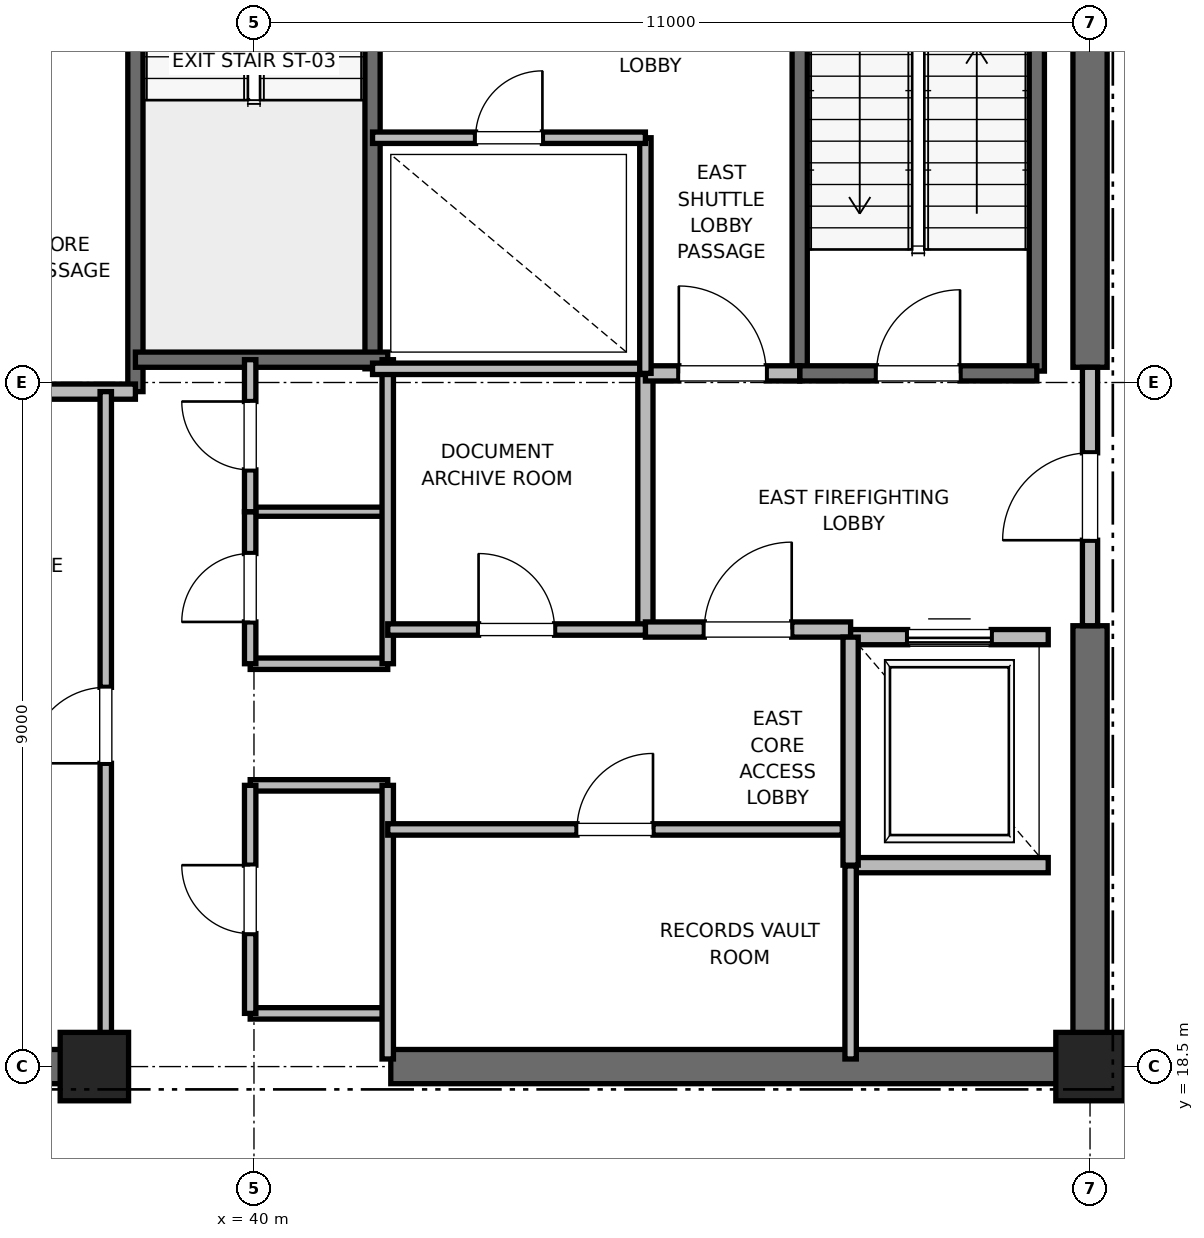
"""IFC4 building model, lengths in metres.
Left out: names, types, materials, properties, quantities, classifications, styles, units other than length and angle.
Written with IfcOpenShell. Run it as: python <this file> out.ifc"""

import sys

from ifc_helpers import new_model, si_unit, direction, frame, frame_2d, origin, origin_2d, place, context, subcontext, project, spatial, rectangle, extrude, element, fill, save


model = new_model("IFC4")
c1 = context("Model", 3, precision=1e-05, world=origin(), true_north=direction((0.0, 1.0)))
c2 = subcontext(c1, "Body", "Model", "MODEL_VIEW")
j1 = project(units=[si_unit("LENGTHUNIT", "METRE"), si_unit("PLANEANGLEUNIT", "RADIAN")], contexts=[c1])
p1 = place(None, origin())
s1 = spatial("IfcSite", under=j1, at=p1, CompositionType="ELEMENT")
p2 = place(p1, origin())
s2 = spatial("IfcBuilding", under=s1, at=p2, CompositionType="ELEMENT")
p3 = place(p2, frame((0.0, 0.0, 275.2)))
s3 = spatial("IfcBuildingStorey", under=s2, at=p3, CompositionType="ELEMENT", Elevation=275.2)
for number, where, z_axis, x_axis in (
    (1, (51.0, 18.5, 0.0), (0.0, 0.0, 1.0), (1.0, 0.0, 0.0)),
    (2, (37.9, 18.5, 0.0), (0.0, 0.0, 1.0), (1.0, 0.0, 0.0)),
):
    element("IfcColumn", number, at=place(p3, frame(where, z_axis=z_axis, x_axis=x_axis)), inside=s3, PredefinedType="PILASTER", context=c2, shape_type="SweptSolid", body=[
        extrude(rectangle(XDim=0.9, YDim=0.9, at=origin_2d()), origin(), (0.0, 0.0, 1.0), 4.0),
    ])
for number, where, z_axis, x_axis in (
    (3, (29.0, 18.5, 0.0), (0.0, 0.0, 1.0), (1.0, 0.0, 0.0)),
    (4, (41.8, 18.5, 0.0), (0.0, 0.0, 1.0), (1.0, 0.0, 0.0)),
):
    element("IfcWall", number, at=place(p3, frame(where, z_axis=z_axis, x_axis=x_axis)), inside=s3, PredefinedType="SHEAR", context=c2, shape_type="SweptSolid", body=[
        extrude(rectangle(XDim=9.2, YDim=0.45, at=frame_2d((4.6, 0.0))), origin(), (0.0, 0.0, 1.0), 3.785),
    ])
p4 = place(p3, frame((51.0, 18.5, 0.0), z_axis=(0.0, 0.0, 1.0), x_axis=(0.0, 1.0, 0.0)))
e5 = element("IfcWall", 5, at=p4, inside=s3, PredefinedType="SHEAR", context=c2, shape_type="SweptSolid", body=[
    extrude(rectangle(XDim=5.8, YDim=0.45, at=frame_2d((2.9, 0.0))), origin(), (0.0, 0.0, 1.0), 3.785),
])
p5 = place(p3, frame((51.0, 27.7, 0.0), z_axis=(0.0, 0.0, 1.0), x_axis=(0.0, 1.0, 0.0)))
e6 = element("IfcWall", 6, at=p5, inside=s3, PredefinedType="SHEAR", context=c2, shape_type="SweptSolid", body=[
    extrude(rectangle(XDim=8.8, YDim=0.45, at=frame_2d((4.4, 0.0))), origin(), (0.0, 0.0, 1.0), 3.785),
])
p6 = place(p3, frame((50.3, 27.65, 0.0), z_axis=(0.0, 0.0, 1.0), x_axis=(0.0, 1.0, 0.0)))
e7 = element("IfcWall", 7, at=p6, inside=s3, PredefinedType="SOLIDWALL", context=c2, shape_type="SweptSolid", body=[
    extrude(rectangle(XDim=8.15, YDim=0.2, at=frame_2d((4.075, 0.0))), origin(), (0.0, 0.0, 1.0), 3.785),
])
p7 = place(p3, frame((47.18, 27.62, 0.0), z_axis=(0.0, 0.0, 1.0), x_axis=(0.0, 1.0, 0.0)))
e8 = element("IfcWall", 8, at=p7, inside=s3, PredefinedType="SOLIDWALL", context=c2, shape_type="SweptSolid", body=[
    extrude(rectangle(XDim=8.18, YDim=0.2, at=frame_2d((4.09, 0.0))), origin(), (0.0, 0.0, 1.0), 3.785),
])
p8 = place(p3, frame((47.18, 27.62, 0.0), z_axis=(0.0, 0.0, 1.0), x_axis=(1.0, 0.0, 0.0)))
e9 = element("IfcWall", 9, at=p8, inside=s3, PredefinedType="SOLIDWALL", context=c2, shape_type="SweptSolid", body=[
    extrude(rectangle(XDim=3.12, YDim=0.2, at=frame_2d((1.56, 0.0))), origin(), (0.0, 0.0, 1.0), 3.785),
])
p9 = place(p8, frame((1.01, 0.0, 0.0)))
e10 = element("IfcOpeningElement", 10, at=p9, cuts=e9, PredefinedType="OPENING", context=c2, shape_type="SweptSolid", body=[
    extrude(rectangle(XDim=1.1, YDim=2.15, at=frame_2d((0.55, 1.075))), frame((0.0, 0.1, 0.0), z_axis=(0.0, -1.0, 0.0), x_axis=(1.0, 0.0, 0.0)), (0.0, 0.0, 1.0), 0.2),
])
p10 = place(p3, frame((38.44, 27.38, 0.0), z_axis=(0.0, 0.0, 1.0), x_axis=(0.0, 1.0, 0.0)))
e11 = element("IfcWall", 11, at=p10, inside=s3, PredefinedType="SOLIDWALL", context=c2, shape_type="SweptSolid", body=[
    extrude(rectangle(XDim=8.87, YDim=0.2, at=frame_2d((4.435, 0.0))), origin(), (0.0, 0.0, 1.0), 3.785),
])
p11 = place(p3, frame((41.56, 27.68, 0.0), z_axis=(0.0, 0.0, 1.0), x_axis=(0.0, 1.0, 0.0)))
e12 = element("IfcWall", 12, at=p11, inside=s3, PredefinedType="SOLIDWALL", context=c2, shape_type="SweptSolid", body=[
    extrude(rectangle(XDim=8.57, YDim=0.2, at=frame_2d((4.285, 0.0))), origin(), (0.0, 0.0, 1.0), 3.785),
])
p12 = place(p3, frame((38.44, 27.8, 0.0), z_axis=(0.0, 0.0, 1.0), x_axis=(1.0, 0.0, 0.0)))
e13 = element("IfcWall", 13, at=p12, inside=s3, PredefinedType="SOLIDWALL", context=c2, shape_type="SweptSolid", body=[
    extrude(rectangle(XDim=3.32, YDim=0.2, at=frame_2d((1.66, 0.0))), origin(), (0.0, 0.0, 1.0), 3.785),
])
p13 = place(p3, frame((32.82, 27.38, 0.0), z_axis=(0.0, 0.0, 1.0), x_axis=(1.0, 0.0, 0.0)))
e14 = element("IfcWall", 14, at=p13, inside=s3, PredefinedType="PARTITIONING", context=c2, shape_type="SweptSolid", body=[
    extrude(rectangle(XDim=5.62, YDim=0.2, at=frame_2d((2.81, 0.0))), origin(), (0.0, 0.0, 1.0), 3.785),
])
p14 = place(p3, frame((45.15, 24.25, 0.0), z_axis=(0.0, 0.0, 1.0), x_axis=(0.0, 1.0, 0.0)))
e15 = element("IfcWall", 15, at=p14, inside=s3, PredefinedType="PARTITIONING", context=c2, shape_type="SweptSolid", body=[
    extrude(rectangle(XDim=3.37, YDim=0.2, at=frame_2d((1.685, 0.0))), origin(), (0.0, 0.0, 1.0), 3.785),
])
p15 = place(p3, frame((45.15, 24.25, 0.0), z_axis=(0.0, 0.0, 1.0), x_axis=(1.0, 0.0, 0.0)))
e16 = element("IfcWall", 16, at=p15, inside=s3, PredefinedType="PARTITIONING", context=c2, shape_type="SweptSolid", body=[
    extrude(rectangle(XDim=2.7, YDim=0.2, at=frame_2d((1.35, 0.0))), origin(), (0.0, 0.0, 1.0), 3.785),
])
p16 = place(p15, frame((0.775, 0.0, 0.0)))
e17 = element("IfcOpeningElement", 17, at=p16, cuts=e16, PredefinedType="OPENING", context=c2, shape_type="SweptSolid", body=[
    extrude(rectangle(XDim=1.15, YDim=2.2, at=frame_2d((0.575, 1.1))), frame((0.0, 0.1, 0.0), z_axis=(0.0, -1.0, 0.0), x_axis=(1.0, 0.0, 0.0)), (0.0, 0.0, 1.0), 0.2),
])
p17 = place(p3, frame((45.15, 27.62, 0.0), z_axis=(0.0, 0.0, 1.0), x_axis=(1.0, 0.0, 0.0)))
e18 = element("IfcWall", 18, at=p17, inside=s3, PredefinedType="PARTITIONING", context=c2, shape_type="SweptSolid", body=[
    extrude(rectangle(XDim=2.03, YDim=0.2, at=frame_2d((1.015, 0.0))), origin(), (0.0, 0.0, 1.0), 3.785),
])
p18 = place(p17, frame((0.44, 0.0, 0.0)))
e19 = element("IfcOpeningElement", 19, at=p18, cuts=e18, PredefinedType="OPENING", context=c2, shape_type="SweptSolid", body=[
    extrude(rectangle(XDim=1.15, YDim=2.2, at=frame_2d((0.575, 1.1))), frame((0.0, 0.1, 0.0), z_axis=(0.0, -1.0, 0.0), x_axis=(1.0, 0.0, 0.0)), (0.0, 0.0, 1.0), 0.2),
])
p19 = place(p3, frame((51.0, 24.3, 0.0), z_axis=(0.0, 0.0, 1.0), x_axis=(0.0, 1.0, 0.0)))
e20 = element("IfcWall", 20, at=p19, inside=s3, PredefinedType="PARTITIONING", context=c2, shape_type="SweptSolid", body=[
    extrude(rectangle(XDim=3.4, YDim=0.2, at=frame_2d((1.7, 0.0))), origin(), (0.0, 0.0, 1.0), 2.865),
])
p20 = place(p19, frame((1.125, 0.0, 0.0)))
e21 = element("IfcOpeningElement", 21, at=p20, cuts=e20, PredefinedType="OPENING", context=c2, shape_type="SweptSolid", body=[
    extrude(rectangle(XDim=1.15, YDim=2.2, at=frame_2d((0.575, 1.1))), frame((0.0, 0.1, 0.0), z_axis=(0.0, -1.0, 0.0), x_axis=(1.0, 0.0, 0.0)), (0.0, 0.0, 1.0), 0.2),
])
p21 = place(p3, frame((47.85, 21.15, 0.0), z_axis=(0.0, 0.0, 1.0), x_axis=(1.0, 0.0, 0.0)))
e22 = element("IfcWall", 22, at=p21, inside=s3, PredefinedType="SOLIDWALL", context=c2, shape_type="SweptSolid", body=[
    extrude(rectangle(XDim=2.6, YDim=0.2, at=frame_2d((1.3, 0.0))), origin(), (0.0, 0.0, 1.0), 3.785),
])
p22 = place(p3, frame((50.45, 24.15, 0.0), z_axis=(0.0, 0.0, 1.0), x_axis=(-1.0, 0.0, 0.0)))
e23 = element("IfcWall", 23, at=p22, inside=s3, PredefinedType="SOLIDWALL", context=c2, shape_type="SweptSolid", body=[
    extrude(rectangle(XDim=2.6, YDim=0.2, at=frame_2d((1.3, 0.0))), origin(), (0.0, 0.0, 1.0), 2.865),
])
p23 = place(p22, frame((0.75, 0.0, 0.0)))
e24 = element("IfcOpeningElement", 24, at=p23, cuts=e23, PredefinedType="OPENING", context=c2, shape_type="SweptSolid", body=[
    extrude(rectangle(XDim=1.1, YDim=2.2, at=frame_2d((0.55, 1.1))), frame((0.0, 0.1, 0.0), z_axis=(0.0, -1.0, 0.0), x_axis=(1.0, 0.0, 0.0)), (0.0, 0.0, 1.0), 0.2),
])
p24 = place(p3, frame((47.85, 24.15, 0.0), z_axis=(0.0, 0.0, 1.0), x_axis=(0.0, -1.0, 0.0)))
e25 = element("IfcWall", 25, at=p24, inside=s3, PredefinedType="SOLIDWALL", context=c2, shape_type="SweptSolid", body=[
    extrude(rectangle(XDim=3.0, YDim=0.2, at=frame_2d((1.5, 0.0))), origin(), (0.0, 0.0, 1.0), 3.785),
])
for number, where, z_axis, x_axis in (
    (26, (39.95, 19.2, 0.0), (0.0, 0.0, 1.0), (1.0, 0.0, 0.0)),
    (27, (39.95, 22.2, 0.0), (0.0, 0.0, 1.0), (1.0, 0.0, 0.0)),
    (28, (39.95, 23.8, 0.0), (0.0, 0.0, 1.0), (1.0, 0.0, 0.0)),
):
    element("IfcWall", number, at=place(p3, frame(where, z_axis=z_axis, x_axis=x_axis)), inside=s3, PredefinedType="PARTITIONING", context=c2, shape_type="SweptSolid", body=[
        extrude(rectangle(XDim=1.81, YDim=0.15, at=frame_2d((0.905, 0.0))), origin(), (0.0, 0.0, 1.0), 2.85),
    ])
p25 = place(p3, frame((39.95, 25.8, 0.0), z_axis=(0.0, 0.0, 1.0), x_axis=(1.0, 0.0, 0.0)))
e29 = element("IfcWall", 29, at=p25, inside=s3, PredefinedType="PARTITIONING", context=c2, shape_type="SweptSolid", body=[
    extrude(rectangle(XDim=1.81, YDim=0.12, at=frame_2d((0.905, 0.0))), origin(), (0.0, 0.0, 1.0), 2.85),
])
p26 = place(p3, frame((41.76, 18.6, 0.0), z_axis=(0.0, 0.0, 1.0), x_axis=(0.0, 1.0, 0.0)))
e30 = element("IfcWall", 30, at=p26, inside=s3, PredefinedType="PARTITIONING", context=c2, shape_type="SweptSolid", body=[
    extrude(rectangle(XDim=3.6, YDim=0.15, at=frame_2d((1.8, 0.0))), origin(), (0.0, 0.0, 1.0), 2.85),
])
p27 = place(p3, frame((41.76, 23.8, 0.0), z_axis=(0.0, 0.0, 1.0), x_axis=(0.0, 1.0, 0.0)))
e31 = element("IfcWall", 31, at=p27, inside=s3, PredefinedType="PARTITIONING", context=c2, shape_type="SweptSolid", body=[
    extrude(rectangle(XDim=4.0, YDim=0.15, at=frame_2d((2.0, 0.0))), origin(), (0.0, 0.0, 1.0), 2.85),
])
p28 = place(p3, frame((39.95, 19.2, 0.0), z_axis=(0.0, 0.0, 1.0), x_axis=(0.0, 1.0, 0.0)))
e32 = element("IfcWall", 32, at=p28, inside=s3, PredefinedType="PARTITIONING", context=c2, shape_type="SweptSolid", body=[
    extrude(rectangle(XDim=3.0, YDim=0.15, at=frame_2d((1.5, 0.0))), origin(), (0.0, 0.0, 1.0), 2.85),
])
p29 = place(p28, frame((1.05, 0.0, 0.0)))
e33 = element("IfcOpeningElement", 33, at=p29, cuts=e32, PredefinedType="OPENING", context=c2, shape_type="SweptSolid", body=[
    extrude(rectangle(XDim=0.9, YDim=2.1, at=frame_2d((0.45, 1.05))), frame((0.0, 0.075, 0.0), z_axis=(0.0, -1.0, 0.0), x_axis=(1.0, 0.0, 0.0)), (0.0, 0.0, 1.0), 0.15),
])
p30 = place(p3, frame((39.95, 23.8, 0.0), z_axis=(0.0, 0.0, 1.0), x_axis=(0.0, 1.0, 0.0)))
e34 = element("IfcWall", 34, at=p30, inside=s3, PredefinedType="PARTITIONING", context=c2, shape_type="SweptSolid", body=[
    extrude(rectangle(XDim=2.0, YDim=0.15, at=frame_2d((1.0, 0.0))), origin(), (0.0, 0.0, 1.0), 2.85),
])
p31 = place(p30, frame((0.55, 0.0, 0.0)))
e35 = element("IfcOpeningElement", 35, at=p31, cuts=e34, PredefinedType="OPENING", context=c2, shape_type="SweptSolid", body=[
    extrude(rectangle(XDim=0.9, YDim=2.1, at=frame_2d((0.45, 1.05))), frame((0.0, 0.075, 0.0), z_axis=(0.0, -1.0, 0.0), x_axis=(1.0, 0.0, 0.0)), (0.0, 0.0, 1.0), 0.15),
])
p32 = place(p3, frame((39.95, 25.8, 0.0), z_axis=(0.0, 0.0, 1.0), x_axis=(0.0, 1.0, 0.0)))
e36 = element("IfcWall", 36, at=p32, inside=s3, PredefinedType="PARTITIONING", context=c2, shape_type="SweptSolid", body=[
    extrude(rectangle(XDim=2.0, YDim=0.15, at=frame_2d((1.0, 0.0))), origin(), (0.0, 0.0, 1.0), 2.85),
])
p33 = place(p32, frame((0.55, 0.0, 0.0)))
e37 = element("IfcOpeningElement", 37, at=p33, cuts=e36, PredefinedType="OPENING", context=c2, shape_type="SweptSolid", body=[
    extrude(rectangle(XDim=0.9, YDim=2.1, at=frame_2d((0.45, 1.05))), frame((0.0, 0.075, 0.0), z_axis=(0.0, -1.0, 0.0), x_axis=(1.0, 0.0, 0.0)), (0.0, 0.0, 1.0), 0.15),
])
p34 = place(p3, frame((38.05, 18.6, 0.0), z_axis=(0.0, 0.0, 1.0), x_axis=(0.0, 1.0, 0.0)))
e38 = element("IfcWall", 38, at=p34, inside=s3, PredefinedType="PARTITIONING", context=c2, shape_type="SweptSolid", body=[
    extrude(rectangle(XDim=8.78, YDim=0.15, at=frame_2d((4.39, 0.0))), origin(), (0.0, 0.0, 1.0), 2.85),
])
p35 = place(p34, frame((3.89, 0.0, 0.0)))
e39 = element("IfcOpeningElement", 39, at=p35, cuts=e38, PredefinedType="OPENING", context=c2, shape_type="SweptSolid", body=[
    extrude(rectangle(XDim=1.0, YDim=2.15, at=frame_2d((0.5, 1.075))), frame((0.0, 0.075, 0.0), z_axis=(0.0, -1.0, 0.0), x_axis=(1.0, 0.0, 0.0)), (0.0, 0.0, 1.0), 0.15),
])
p36 = place(p3, frame((41.56, 27.68, 0.0), z_axis=(0.0, 0.0, 1.0), x_axis=(1.0, 0.0, 0.0)))
e40 = element("IfcWall", 40, at=p36, inside=s3, PredefinedType="PARTITIONING", context=c2, shape_type="SweptSolid", body=[
    extrude(rectangle(XDim=3.59, YDim=0.15, at=frame_2d((1.795, 0.0))), origin(), (0.0, 0.0, 1.0), 2.85),
])
p37 = place(p3, frame((47.85, 18.6, 0.0), z_axis=(0.0, 0.0, 1.0), x_axis=(0.0, 1.0, 0.0)))
e41 = element("IfcWall", 41, at=p37, inside=s3, PredefinedType="PARTITIONING", context=c2, shape_type="SweptSolid", body=[
    extrude(rectangle(XDim=2.54, YDim=0.15, at=frame_2d((1.27, 0.0))), origin(), (0.0, 0.0, 1.0), 2.85),
])
p38 = place(p3, frame((41.76, 21.62, 0.0), z_axis=(0.0, 0.0, 1.0), x_axis=(1.0, 0.0, 0.0)))
e42 = element("IfcWall", 42, at=p38, inside=s3, PredefinedType="PARTITIONING", context=c2, shape_type="SweptSolid", body=[
    extrude(rectangle(XDim=5.98, YDim=0.15, at=frame_2d((2.99, 0.0))), origin(), (0.0, 0.0, 1.0), 2.85),
])
p39 = place(p38, frame((2.49, 0.0, 0.0)))
e43 = element("IfcOpeningElement", 43, at=p39, cuts=e42, PredefinedType="OPENING", context=c2, shape_type="SweptSolid", body=[
    extrude(rectangle(XDim=1.0, YDim=2.15, at=frame_2d((0.5, 1.075))), frame((0.0, 0.075, 0.0), z_axis=(0.0, -1.0, 0.0), x_axis=(1.0, 0.0, 0.0)), (0.0, 0.0, 1.0), 0.15),
])
p40 = place(p3, frame((41.76, 24.25, 0.0), z_axis=(0.0, 0.0, 1.0), x_axis=(1.0, 0.0, 0.0)))
e44 = element("IfcWall", 44, at=p40, inside=s3, PredefinedType="PARTITIONING", context=c2, shape_type="SweptSolid", body=[
    extrude(rectangle(XDim=3.39, YDim=0.15, at=frame_2d((1.695, 0.0))), origin(), (0.0, 0.0, 1.0), 2.85),
])
p41 = place(p40, frame((1.195, 0.0, 0.0)))
e45 = element("IfcOpeningElement", 45, at=p41, cuts=e44, PredefinedType="OPENING", context=c2, shape_type="SweptSolid", body=[
    extrude(rectangle(XDim=1.0, YDim=2.15, at=frame_2d((0.5, 1.075))), frame((0.0, 0.075, 0.0), z_axis=(0.0, -1.0, 0.0), x_axis=(1.0, 0.0, 0.0)), (0.0, 0.0, 1.0), 0.15),
])
p42 = place(p3, frame((45.15, 27.62, 0.0), z_axis=(0.0, 0.0, 1.0), x_axis=(0.0, 1.0, 0.0)))
e46 = element("IfcWall", 46, at=p42, inside=s3, PredefinedType="PARTITIONING", context=c2, shape_type="SweptSolid", body=[
    extrude(rectangle(XDim=3.1, YDim=0.15, at=frame_2d((1.55, 0.0))), origin(), (0.0, 0.0, 1.0), 2.85),
])
p43 = place(p3, frame((41.56, 30.72, 0.0), z_axis=(0.0, 0.0, 1.0), x_axis=(1.0, 0.0, 0.0)))
e47 = element("IfcWall", 47, at=p43, inside=s3, PredefinedType="PARTITIONING", context=c2, shape_type="SweptSolid", body=[
    extrude(rectangle(XDim=3.59, YDim=0.15, at=frame_2d((1.795, 0.0))), origin(), (0.0, 0.0, 1.0), 2.85),
])
p44 = place(p43, frame((1.355, 0.0, 0.0)))
e48 = element("IfcOpeningElement", 48, at=p44, cuts=e47, PredefinedType="OPENING", context=c2, shape_type="SweptSolid", body=[
    extrude(rectangle(XDim=0.88, YDim=2.1, at=frame_2d((0.44, 1.05))), frame((0.0, 0.075, 0.0), z_axis=(0.0, -1.0, 0.0), x_axis=(1.0, 0.0, 0.0)), (0.0, 0.0, 1.0), 0.15),
])
p45 = place(p9, origin())
e49 = element("IfcDoor", 49, at=p45, inside=s3, OperationType="SINGLE_SWING_RIGHT", PredefinedType="DOOR", context=c2, shape_type="SweptSolid", body=[
    extrude(rectangle(XDim=1.1, YDim=2.15, at=frame_2d((0.55, 1.075))), frame((0.0, 0.025, 0.0), z_axis=(0.0, -1.0, 0.0), x_axis=(1.0, 0.0, 0.0)), (0.0, 0.0, 1.0), 0.05),
])
fill(e10, e49)
p46 = place(p16, origin())
e50 = element("IfcDoor", 50, at=p46, inside=s3, OperationType="SINGLE_SWING_RIGHT", PredefinedType="DOOR", context=c2, shape_type="SweptSolid", body=[
    extrude(rectangle(XDim=1.15, YDim=2.2, at=frame_2d((0.575, 1.1))), frame((0.0, 0.025, 0.0), z_axis=(0.0, -1.0, 0.0), x_axis=(1.0, 0.0, 0.0)), (0.0, 0.0, 1.0), 0.05),
])
fill(e17, e50)
p47 = place(p18, origin())
e51 = element("IfcDoor", 51, at=p47, inside=s3, OperationType="SINGLE_SWING_LEFT", PredefinedType="DOOR", context=c2, shape_type="SweptSolid", body=[
    extrude(rectangle(XDim=1.15, YDim=2.2, at=frame_2d((0.575, 1.1))), frame((0.0, 0.025, 0.0), z_axis=(0.0, -1.0, 0.0), x_axis=(1.0, 0.0, 0.0)), (0.0, 0.0, 1.0), 0.05),
])
fill(e19, e51)
p48 = place(p20, origin())
e52 = element("IfcDoor", 52, at=p48, inside=s3, OperationType="SINGLE_SWING_LEFT", PredefinedType="DOOR", context=c2, shape_type="SweptSolid", body=[
    extrude(rectangle(XDim=1.15, YDim=2.2, at=frame_2d((0.575, 1.1))), frame((0.0, 0.025, 0.0), z_axis=(0.0, -1.0, 0.0), x_axis=(1.0, 0.0, 0.0)), (0.0, 0.0, 1.0), 0.05),
])
fill(e21, e52)
p49 = place(p23, origin())
e53 = element("IfcDoor", 53, at=p49, inside=s3, OperationType="SLIDING_TO_RIGHT", PredefinedType="DOOR", context=c2, shape_type="SweptSolid", body=[
    extrude(rectangle(XDim=1.1, YDim=2.2, at=frame_2d((0.55, 1.1))), frame((0.0, 0.025, 0.0), z_axis=(0.0, -1.0, 0.0), x_axis=(1.0, 0.0, 0.0)), (0.0, 0.0, 1.0), 0.05),
])
fill(e24, e53)
p50 = place(p29, origin())
e54 = element("IfcDoor", 54, at=p50, inside=s3, OperationType="SINGLE_SWING_RIGHT", PredefinedType="DOOR", context=c2, shape_type="SweptSolid", body=[
    extrude(rectangle(XDim=0.9, YDim=2.1, at=frame_2d((0.45, 1.05))), frame((0.0, 0.025, 0.0), z_axis=(0.0, -1.0, 0.0), x_axis=(1.0, 0.0, 0.0)), (0.0, 0.0, 1.0), 0.05),
])
fill(e33, e54)
p51 = place(p31, origin())
e55 = element("IfcDoor", 55, at=p51, inside=s3, OperationType="SINGLE_SWING_LEFT", PredefinedType="DOOR", context=c2, shape_type="SweptSolid", body=[
    extrude(rectangle(XDim=0.9, YDim=2.1, at=frame_2d((0.45, 1.05))), frame((0.0, 0.025, 0.0), z_axis=(0.0, -1.0, 0.0), x_axis=(1.0, 0.0, 0.0)), (0.0, 0.0, 1.0), 0.05),
])
fill(e35, e55)
p52 = place(p33, origin())
e56 = element("IfcDoor", 56, at=p52, inside=s3, OperationType="SINGLE_SWING_RIGHT", PredefinedType="DOOR", context=c2, shape_type="SweptSolid", body=[
    extrude(rectangle(XDim=0.9, YDim=2.1, at=frame_2d((0.45, 1.05))), frame((0.0, 0.025, 0.0), z_axis=(0.0, -1.0, 0.0), x_axis=(1.0, 0.0, 0.0)), (0.0, 0.0, 1.0), 0.05),
])
fill(e37, e56)
p53 = place(p35, origin())
e57 = element("IfcDoor", 57, at=p53, inside=s3, OperationType="SINGLE_SWING_LEFT", PredefinedType="DOOR", context=c2, shape_type="SweptSolid", body=[
    extrude(rectangle(XDim=1.0, YDim=2.15, at=frame_2d((0.5, 1.075))), frame((0.0, 0.025, 0.0), z_axis=(0.0, -1.0, 0.0), x_axis=(1.0, 0.0, 0.0)), (0.0, 0.0, 1.0), 0.05),
])
fill(e39, e57)
p54 = place(p39, origin())
e58 = element("IfcDoor", 58, at=p54, inside=s3, OperationType="SINGLE_SWING_RIGHT", PredefinedType="DOOR", context=c2, shape_type="SweptSolid", body=[
    extrude(rectangle(XDim=1.0, YDim=2.15, at=frame_2d((0.5, 1.075))), frame((0.0, 0.025, 0.0), z_axis=(0.0, -1.0, 0.0), x_axis=(1.0, 0.0, 0.0)), (0.0, 0.0, 1.0), 0.05),
])
fill(e43, e58)
p55 = place(p41, origin())
e59 = element("IfcDoor", 59, at=p55, inside=s3, OperationType="SINGLE_SWING_LEFT", PredefinedType="DOOR", context=c2, shape_type="SweptSolid", body=[
    extrude(rectangle(XDim=1.0, YDim=2.15, at=frame_2d((0.5, 1.075))), frame((0.0, 0.025, 0.0), z_axis=(0.0, -1.0, 0.0), x_axis=(1.0, 0.0, 0.0)), (0.0, 0.0, 1.0), 0.05),
])
fill(e45, e59)
p56 = place(p44, origin())
e60 = element("IfcDoor", 60, at=p56, inside=s3, OperationType="SINGLE_SWING_RIGHT", PredefinedType="DOOR", context=c2, shape_type="SweptSolid", body=[
    extrude(rectangle(XDim=0.88, YDim=2.1, at=frame_2d((0.44, 1.05))), frame((0.0, 0.025, 0.0), z_axis=(0.0, -1.0, 0.0), x_axis=(1.0, 0.0, 0.0)), (0.0, 0.0, 1.0), 0.05),
])
fill(e48, e60)
save(model, sys.argv[1])
